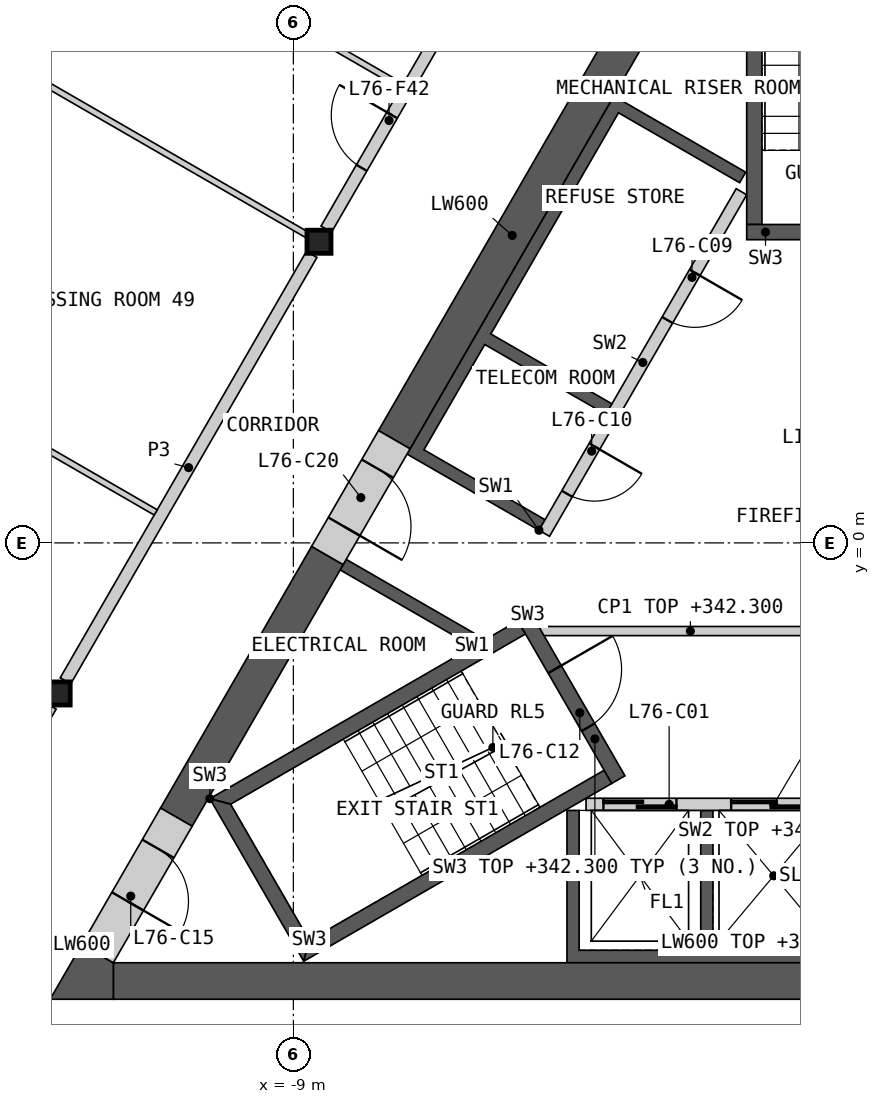
"""IFC4 building model, lengths in metres.
Left out: names, types, materials, properties, quantities, classifications, styles, units other than length and angle.
Written with IfcOpenShell. Run it as: python <this file> out.ifc"""

import sys

from ifc_helpers import new_model, si_unit, direction, frame, frame_2d, origin, origin_2d, place, context, subcontext, project, spatial, polyline, rectangle, i_section, outline, extrude, element, fill, save


model = new_model("IFC4")
c1 = context("Model", 3, precision=1e-05, world=origin(), true_north=direction((0.0, 1.0)))
c2 = subcontext(c1, "Body", "Model", "MODEL_VIEW")
j1 = project(units=[si_unit("LENGTHUNIT", "METRE"), si_unit("PLANEANGLEUNIT", "RADIAN")], contexts=[c1])
p1 = place(None, origin())
s1 = spatial("IfcSite", under=j1, at=p1, CompositionType="ELEMENT")
p2 = place(p1, origin())
s2 = spatial("IfcBuilding", under=s1, at=p2, CompositionType="ELEMENT")
p3 = place(p2, frame((0.0, 0.0, 339.2)))
s3 = spatial("IfcBuildingStorey", under=s2, at=p3, CompositionType="ELEMENT", Elevation=339.2)
for number, where, z_axis, x_axis in (
    (1, (-8.578, 4.953, 0.0), (0.0, 0.0, 1.0), (1.0, 0.0, 0.0)),
    (2, (-12.868, -2.476, 0.0), (0.0, 0.0, 1.0), (1.0, 0.0, 0.0)),
):
    element("IfcColumn", number, at=place(p3, frame(where, z_axis=z_axis, x_axis=x_axis)), inside=s3, PredefinedType="COLUMN", context=c2, shape_type="SweptSolid", body=[
        extrude(i_section(OverallWidth=0.396, OverallDepth=0.381, WebThickness=0.019, FlangeThickness=0.03, at=origin_2d()), origin(), (0.0, 0.0, 1.0), 3.4),
    ])
p4 = place(p3, origin())
e3 = element("IfcWall", 3, at=p4, inside=s3, PredefinedType="SHEAR", context=c2, shape_type="SweptSolid", body=[
    extrude(outline(polyline([(4.5, -4.4), (4.5, -6.906), (-4.5, -6.906), (-4.5, -4.4), (-4.3, -4.4), (-4.3, -6.7), (-2.3, -6.7), (-2.3, -4.4), (-2.1, -4.4), (-2.1, -6.7), (-0.1, -6.7), (-0.1, -4.4), (0.1, -4.4), (0.1, -6.7), (2.1, -6.7), (2.1, -4.4), (2.3, -4.4), (2.3, -6.7), (4.3, -6.7), (4.3, -4.4), (4.5, -4.4)])), origin(), (0.0, 0.0, 1.0), 3.1),
])
p5 = place(p3, frame((-4.187, -4.3, 0.0), z_axis=(0.0, 0.0, 1.0), x_axis=(1.0, 0.0, 0.0)))
e4 = element("IfcWall", 4, at=p5, inside=s3, PredefinedType="SOLIDWALL", context=c2, shape_type="SweptSolid", body=[
    extrude(rectangle(XDim=8.373, YDim=0.2, at=frame_2d((4.187, 0.0))), origin(), (0.0, 0.0, 1.0), 3.1),
])
p6 = place(p5, frame((0.287, 0.0, 0.0)))
e5 = element("IfcOpeningElement", 5, at=p6, cuts=e4, PredefinedType="OPENING", context=c2, shape_type="SweptSolid", body=[
    extrude(rectangle(XDim=1.2, YDim=2.1, at=frame_2d((0.6, 1.05))), frame((0.0, 0.11, 0.0), z_axis=(0.0, -1.0, 0.0), x_axis=(1.0, 0.0, 0.0)), (0.0, 0.0, 1.0), 0.22),
])
p7 = place(p5, frame((2.387, 0.0, 0.0)))
e6 = element("IfcOpeningElement", 6, at=p7, cuts=e4, PredefinedType="OPENING", context=c2, shape_type="SweptSolid", body=[
    extrude(rectangle(XDim=1.4, YDim=2.1, at=frame_2d((0.7, 1.05))), frame((0.0, 0.11, 0.0), z_axis=(0.0, -1.0, 0.0), x_axis=(1.0, 0.0, 0.0)), (0.0, 0.0, 1.0), 0.22),
])
p8 = place(p5, frame((4.737, 0.0, 0.0)))
e7 = element("IfcOpeningElement", 7, at=p8, cuts=e4, PredefinedType="OPENING", context=c2, shape_type="SweptSolid", body=[
    extrude(rectangle(XDim=1.1, YDim=2.1, at=frame_2d((0.55, 1.05))), frame((0.0, 0.11, 0.0), z_axis=(0.0, -1.0, 0.0), x_axis=(1.0, 0.0, 0.0)), (0.0, 0.0, 1.0), 0.22),
])
p9 = place(p5, frame((6.887, 0.0, 0.0)))
e8 = element("IfcOpeningElement", 8, at=p9, cuts=e4, PredefinedType="OPENING", context=c2, shape_type="SweptSolid", body=[
    extrude(rectangle(XDim=1.2, YDim=2.1, at=frame_2d((0.6, 1.05))), frame((0.0, 0.11, 0.0), z_axis=(0.0, -1.0, 0.0), x_axis=(1.0, 0.0, 0.0)), (0.0, 0.0, 1.0), 0.22),
])
p10 = place(p3, origin())
e9 = element("IfcWall", 9, at=p10, inside=s3, PredefinedType="SHEAR", context=c2, shape_type="SweptSolid", body=[
    extrude(outline(polyline([(-6.061, -1.697), (-8.231, -0.444), (-8.131, -0.271), (-5.96, -1.524), (-6.061, -1.697)])), origin(), (0.0, 0.0, 1.0), 3.1),
])
p11 = place(p3, origin())
e10 = element("IfcWall", 10, at=p11, inside=s3, PredefinedType="SHEAR", context=c2, shape_type="SweptSolid", body=[
    extrude(outline(polyline([(-4.96, 0.208), (-7.131, 1.461), (-3.731, 7.35), (-1.561, 6.097), (-1.66, 5.924), (-3.652, 7.074), (-5.752, 3.437), (-3.76, 2.287), (-3.861, 2.113), (-5.852, 3.263), (-6.852, 1.531), (-4.861, 0.381), (-4.96, 0.208)])), origin(), (0.0, 0.0, 1.0), 3.1),
])
p12 = place(p3, frame((-1.631, 5.776, 0.0), z_axis=(0.0, 0.0, 1.0), x_axis=(-0.499992876559, -0.866029516466, 0.0)))
e11 = element("IfcWall", 11, at=p12, inside=s3, PredefinedType="SOLIDWALL", context=c2, shape_type="SweptSolid", body=[
    extrude(rectangle(XDim=6.486, YDim=0.2, at=frame_2d((3.243, 0.0))), origin(), (0.0, 0.0, 1.0), 3.1),
])
p13 = place(p12, frame((1.537, 0.0, 0.0)))
e12 = element("IfcOpeningElement", 12, at=p13, cuts=e11, PredefinedType="OPENING", context=c2, shape_type="SweptSolid", body=[
    extrude(rectangle(XDim=0.9, YDim=2.1, at=frame_2d((0.45, 1.05))), frame((0.0, 0.11, 0.0), z_axis=(0.0, -1.0, 0.0), x_axis=(1.0, 0.0, 0.0)), (0.0, 0.0, 1.0), 0.22),
])
p14 = place(p12, frame((4.837, 0.0, 0.0)))
e13 = element("IfcOpeningElement", 13, at=p14, cuts=e11, PredefinedType="OPENING", context=c2, shape_type="SweptSolid", body=[
    extrude(rectangle(XDim=0.9, YDim=2.1, at=frame_2d((0.45, 1.05))), frame((0.0, 0.11, 0.0), z_axis=(0.0, -1.0, 0.0), x_axis=(1.0, 0.0, 0.0)), (0.0, 0.0, 1.0), 0.22),
])
p15 = place(p3, frame((-4.941, -1.45, 0.0), z_axis=(0.0, 0.0, 1.0), x_axis=(1.0, 0.0, 0.0)))
e14 = element("IfcWall", 14, at=p15, inside=s3, PredefinedType="PARTITIONING", context=c2, shape_type="SweptSolid", body=[
    extrude(rectangle(XDim=9.882, YDim=0.15, at=frame_2d((4.941, 0.0))), origin(), (0.0, 0.0, 1.0), 3.1),
])
p16 = place(p15, frame((4.391, 0.0, 0.0)))
e15 = element("IfcOpeningElement", 15, at=p16, cuts=e14, PredefinedType="OPENING", context=c2, shape_type="SweptSolid", body=[
    extrude(rectangle(XDim=1.1, YDim=2.1, at=frame_2d((0.55, 1.05))), frame((0.0, 0.085, 0.0), z_axis=(0.0, -1.0, 0.0), x_axis=(1.0, 0.0, 0.0)), (0.0, 0.0, 1.0), 0.17),
])
p17 = place(p3, origin())
e16 = element("IfcWall", 16, at=p17, inside=s3, PredefinedType="SHEAR", context=c2, shape_type="SweptSolid", body=[
    extrude(outline(polyline([(-5.307, -1.281), (-10.374, -4.206), (-10.032, -4.298), (-5.182, -1.498), (-5.307, -1.281)])), origin(), (0.0, 0.0, 1.0), 3.1),
])
p18 = place(p3, origin())
e17 = element("IfcWall", 17, at=p18, inside=s3, PredefinedType="SHEAR", context=c2, shape_type="SweptSolid", body=[
    extrude(outline(polyline([(-10.374, -4.206), (-8.83, -6.881), (-8.738, -6.539), (-10.032, -4.298), (-10.374, -4.206)])), origin(), (0.0, 0.0, 1.0), 3.1),
])
p19 = place(p3, origin())
e18 = element("IfcWall", 18, at=p19, inside=s3, PredefinedType="SHEAR", context=c2, shape_type="SweptSolid", body=[
    extrude(outline(polyline([(-8.738, -6.539), (-8.83, -6.881), (-3.763, -3.956), (-3.888, -3.739), (-8.738, -6.539)])), origin(), (0.0, 0.0, 1.0), 3.1),
])
p20 = place(p3, frame((-5.199, -1.219, 0.0), z_axis=(0.0, 0.0, 1.0), x_axis=(0.499982516597, -0.866035497597, 0.0)))
e19 = element("IfcWall", 19, at=p20, inside=s3, PredefinedType="SHEAR", context=c2, shape_type="SweptSolid", body=[
    extrude(rectangle(XDim=3.088, YDim=0.25, at=frame_2d((1.544, 0.0))), origin(), (0.0, 0.0, 1.0), 3.1),
])
p21 = place(p20, frame((0.994, 0.0, 0.0)))
e20 = element("IfcOpeningElement", 20, at=p21, cuts=e19, PredefinedType="OPENING", context=c2, shape_type="SweptSolid", body=[
    extrude(rectangle(XDim=1.1, YDim=2.1, at=frame_2d((0.55, 1.05))), frame((0.0, 0.135, 0.0), z_axis=(0.0, -1.0, 0.0), x_axis=(1.0, 0.0, 0.0)), (0.0, 0.0, 1.0), 0.27),
])
p22 = place(p3, origin())
e21 = element("IfcWall", 21, at=p22, inside=s3, PredefinedType="SHEAR", context=c2, shape_type="SweptSolid", body=[
    extrude(outline(polyline([(-1.294, 10.837), (-1.544, 11.087), (-1.544, 5.237), (-1.294, 5.237), (-1.294, 10.837)])), origin(), (0.0, 0.0, 1.0), 3.1),
])
p23 = place(p3, frame((1.544, 5.112, 0.0), z_axis=(0.0, 0.0, 1.0), x_axis=(-1.0, 0.0, 0.0)))
e22 = element("IfcWall", 22, at=p23, inside=s3, PredefinedType="SHEAR", context=c2, shape_type="SweptSolid", body=[
    extrude(rectangle(XDim=3.088, YDim=0.25, at=frame_2d((1.544, 0.0))), origin(), (0.0, 0.0, 1.0), 3.1),
])
p24 = place(p23, frame((0.994, 0.0, 0.0)))
e23 = element("IfcOpeningElement", 23, at=p24, cuts=e22, PredefinedType="OPENING", context=c2, shape_type="SweptSolid", body=[
    extrude(rectangle(XDim=1.1, YDim=2.1, at=frame_2d((0.55, 1.05))), frame((0.0, 0.135, 0.0), z_axis=(0.0, -1.0, 0.0), x_axis=(1.0, 0.0, 0.0)), (0.0, 0.0, 1.0), 0.27),
])
p25 = place(p3, frame((-11.961, -7.206, 0.0), z_axis=(0.0, 0.0, 1.0), x_axis=(1.0, 0.0, 0.0)))
e24 = element("IfcWall", 24, at=p25, inside=s3, PredefinedType="SHEAR", context=c2, shape_type="SweptSolid", body=[
    extrude(rectangle(XDim=23.921, YDim=0.6, at=frame_2d((11.961, 0.0))), origin(), (0.0, 0.0, 1.0), 3.1),
])
p26 = place(p3, frame((-3.461, 8.417, 0.0), z_axis=(0.0, 0.0, 1.0), x_axis=(-0.50000391502, -0.866023143435, 0.0)))
e25 = element("IfcWall", 25, at=p26, inside=s3, PredefinedType="SHEAR", context=c2, shape_type="SweptSolid", body=[
    extrude(rectangle(XDim=7.759, YDim=0.6, at=frame_2d((3.879, 0.0))), origin(), (0.0, 0.0, 1.0), 3.1),
])
p27 = place(p3, frame((-8.44, -0.208, 0.0), z_axis=(0.0, 0.0, 1.0), x_axis=(-0.500007425856, -0.866021116422, 0.0)))
e26 = element("IfcWall", 26, at=p27, inside=s3, PredefinedType="SHEAR", context=c2, shape_type="SweptSolid", body=[
    extrude(rectangle(XDim=4.969, YDim=0.6, at=frame_2d((2.484, 0.0))), origin(), (0.0, 0.0, 1.0), 3.1),
])
p28 = place(p3, origin())
e27 = element("IfcWall", 27, at=p28, inside=s3, PredefinedType="SHEAR", context=c2, shape_type="SweptSolid", body=[
    extrude(outline(polyline([(-12.48, -6.606), (-11.961, -6.906), (-11.961, -7.506), (-13.0, -7.506), (-12.48, -6.606)])), origin(), (0.0, 0.0, 1.0), 3.1),
])
p29 = place(p3, frame((-10.925, -4.511, 0.0), z_axis=(0.0, 0.0, 1.0), x_axis=(-0.500018667571, -0.866014625789, 0.0)))
e28 = element("IfcWall", 28, at=p29, inside=s3, PredefinedType="SHEAR", context=c2, shape_type="SweptSolid", body=[
    extrude(rectangle(XDim=2.592, YDim=0.6, at=frame_2d((1.296, 0.0))), origin(), (0.0, 0.0, 1.0), 3.1),
])
p30 = place(p29, frame((0.6, 0.0, 0.0)))
e29 = element("IfcOpeningElement", 29, at=p30, cuts=e28, PredefinedType="OPENING", context=c2, shape_type="SweptSolid", body=[
    extrude(rectangle(XDim=1.0, YDim=2.1, at=frame_2d((0.5, 1.05))), frame((0.0, 0.31, 0.0), z_axis=(0.0, -1.0, 0.0), x_axis=(1.0, 0.0, 0.0)), (0.0, 0.0, 1.0), 0.62),
])
p31 = place(p3, frame((-7.34, 1.698, 0.0), z_axis=(0.0, 0.0, 1.0), x_axis=(-0.50002983664, -0.866008176907, 0.0)))
e30 = element("IfcWall", 30, at=p31, inside=s3, PredefinedType="SHEAR", context=c2, shape_type="SweptSolid", body=[
    extrude(rectangle(XDim=2.2, YDim=0.6, at=frame_2d((1.1, 0.0))), origin(), (0.0, 0.0, 1.0), 3.1),
])
p32 = place(p31, frame((0.55, 0.0, 0.0)))
e31 = element("IfcOpeningElement", 31, at=p32, cuts=e30, PredefinedType="OPENING", context=c2, shape_type="SweptSolid", body=[
    extrude(rectangle(XDim=1.1, YDim=2.1, at=frame_2d((0.55, 1.05))), frame((0.0, 0.31, 0.0), z_axis=(0.0, -1.0, 0.0), x_axis=(1.0, 0.0, 0.0)), (0.0, 0.0, 1.0), 0.62),
])
p33 = place(p3, frame((-8.458, 5.16, 0.0), z_axis=(0.0, 0.0, 1.0), x_axis=(0.499984266882, 0.866034487114, 0.0)))
e32 = element("IfcWall", 32, at=p33, inside=s3, PredefinedType="PARTITIONING", context=c2, shape_type="SweptSolid", body=[
    extrude(rectangle(XDim=8.099, YDim=0.2, at=frame_2d((4.049, 0.0))), origin(), (0.0, 0.0, 1.0), 3.1),
])
p34 = place(p33, frame((1.164, 0.0, 0.0)))
e33 = element("IfcOpeningElement", 33, at=p34, cuts=e32, PredefinedType="OPENING", context=c2, shape_type="SweptSolid", body=[
    extrude(rectangle(XDim=1.0, YDim=2.1, at=frame_2d((0.5, 1.05))), frame((0.0, 0.11, 0.0), z_axis=(0.0, -1.0, 0.0), x_axis=(1.0, 0.0, 0.0)), (0.0, 0.0, 1.0), 0.22),
])
p35 = place(p3, frame((-12.748, -2.269, 0.0), z_axis=(0.0, 0.0, 1.0), x_axis=(0.499984266882, 0.866034487114, 0.0)))
e34 = element("IfcWall", 34, at=p35, inside=s3, PredefinedType="PARTITIONING", context=c2, shape_type="SweptSolid", body=[
    extrude(rectangle(XDim=8.099, YDim=0.2, at=frame_2d((4.049, 0.0))), origin(), (0.0, 0.0, 1.0), 3.1),
])
p36 = place(p3, frame((-15.131, -6.397, 0.0), z_axis=(0.0, 0.0, 1.0), x_axis=(0.500003406062, 0.866023437285, 0.0)))
e35 = element("IfcWall", 35, at=p36, inside=s3, PredefinedType="PARTITIONING", context=c2, shape_type="SweptSolid", body=[
    extrude(rectangle(XDim=4.288, YDim=0.2, at=frame_2d((2.144, 0.0))), origin(), (0.0, 0.0, 1.0), 3.1),
])
p37 = place(p36, frame((0.766, 0.0, 0.0)))
e36 = element("IfcOpeningElement", 36, at=p37, cuts=e35, PredefinedType="OPENING", context=c2, shape_type="SweptSolid", body=[
    extrude(rectangle(XDim=1.0, YDim=2.1, at=frame_2d((0.5, 1.05))), frame((0.0, 0.11, 0.0), z_axis=(0.0, -1.0, 0.0), x_axis=(1.0, 0.0, 0.0)), (0.0, 0.0, 1.0), 0.22),
])
p38 = place(p3, frame((-19.615, 11.325, 0.0), z_axis=(0.0, 0.0, 1.0), x_axis=(0.86602139559, -0.500006942333, 0.0)))
e37 = element("IfcWall", 37, at=p38, inside=s3, PredefinedType="PARTITIONING", context=c2, shape_type="SweptSolid", body=[
    extrude(rectangle(XDim=12.505, YDim=0.1, at=frame_2d((6.252, 0.0))), origin(), (0.0, 0.0, 1.0), 2.33),
])
p39 = place(p38, frame((6.38, 0.0, 0.0)))
e38 = element("IfcOpeningElement", 38, at=p39, cuts=e37, PredefinedType="OPENING", context=c2, shape_type="SweptSolid", body=[
    extrude(rectangle(XDim=0.95, YDim=2.1, at=frame_2d((0.475, 1.05))), frame((0.0, 0.06, 0.0), z_axis=(0.0, -1.0, 0.0), x_axis=(1.0, 0.0, 0.0)), (0.0, 0.0, 1.0), 0.12),
])
p40 = place(p3, frame((-18.161, 4.484, 0.0), z_axis=(0.0, 0.0, 1.0), x_axis=(0.86602732995, -0.499996663769, 0.0)))
e39 = element("IfcWall", 39, at=p40, inside=s3, PredefinedType="PARTITIONING", context=c2, shape_type="SweptSolid", body=[
    extrude(rectangle(XDim=7.964, YDim=0.1, at=frame_2d((3.982, 0.0))), origin(), (0.0, 0.0, 1.0), 2.33),
])
p41 = place(p40, frame((1.152, 0.0, 0.0)))
e40 = element("IfcOpeningElement", 40, at=p41, cuts=e39, PredefinedType="OPENING", context=c2, shape_type="SweptSolid", body=[
    extrude(rectangle(XDim=0.95, YDim=2.1, at=frame_2d((0.475, 1.05))), frame((0.0, 0.06, 0.0), z_axis=(0.0, -1.0, 0.0), x_axis=(1.0, 0.0, 0.0)), (0.0, 0.0, 1.0), 0.12),
])
p42 = place(p3, frame((-9.511, 8.837, 0.0), z_axis=(0.0, 0.0, 1.0), x_axis=(0.866029095148, -0.499993606316, 0.0)))
e41 = element("IfcWall", 41, at=p42, inside=s3, PredefinedType="PARTITIONING", context=c2, shape_type="SweptSolid", body=[
    extrude(rectangle(XDim=2.65, YDim=0.1, at=frame_2d((1.325, 0.0))), origin(), (0.0, 0.0, 1.0), 2.33),
])
p43 = place(p6, origin())
e42 = element("IfcDoor", 42, at=p43, inside=s3, OperationType="SLIDING_TO_LEFT", PredefinedType="DOOR", context=c2, shape_type="SweptSolid", body=[
    extrude(rectangle(XDim=1.2, YDim=2.1, at=frame_2d((0.6, 1.05))), frame((0.0, 0.025, 0.0), z_axis=(0.0, -1.0, 0.0), x_axis=(1.0, 0.0, 0.0)), (0.0, 0.0, 1.0), 0.05),
])
fill(e5, e42)
p44 = place(p7, origin())
e43 = element("IfcDoor", 43, at=p44, inside=s3, OperationType="SLIDING_TO_LEFT", PredefinedType="DOOR", context=c2, shape_type="SweptSolid", body=[
    extrude(rectangle(XDim=1.4, YDim=2.1, at=frame_2d((0.7, 1.05))), frame((0.0, 0.025, 0.0), z_axis=(0.0, -1.0, 0.0), x_axis=(1.0, 0.0, 0.0)), (0.0, 0.0, 1.0), 0.05),
])
fill(e6, e43)
p45 = place(p13, origin())
e44 = element("IfcDoor", 44, at=p45, inside=s3, OperationType="SINGLE_SWING_LEFT", PredefinedType="DOOR", context=c2, shape_type="SweptSolid", body=[
    extrude(rectangle(XDim=0.9, YDim=2.1, at=frame_2d((0.45, 1.05))), frame((0.0, 0.025, 0.0), z_axis=(0.0, -1.0, 0.0), x_axis=(1.0, 0.0, 0.0)), (0.0, 0.0, 1.0), 0.05),
])
fill(e12, e44)
p46 = place(p14, origin())
e45 = element("IfcDoor", 45, at=p46, inside=s3, OperationType="SINGLE_SWING_LEFT", PredefinedType="DOOR", context=c2, shape_type="SweptSolid", body=[
    extrude(rectangle(XDim=0.9, YDim=2.1, at=frame_2d((0.45, 1.05))), frame((0.0, 0.025, 0.0), z_axis=(0.0, -1.0, 0.0), x_axis=(1.0, 0.0, 0.0)), (0.0, 0.0, 1.0), 0.05),
])
fill(e13, e45)
p47 = place(p21, origin())
e46 = element("IfcDoor", 46, at=p47, inside=s3, OperationType="SINGLE_SWING_LEFT", PredefinedType="DOOR", context=c2, shape_type="SweptSolid", body=[
    extrude(rectangle(XDim=1.1, YDim=2.1, at=frame_2d((0.55, 1.05))), frame((0.0, 0.025, 0.0), z_axis=(0.0, -1.0, 0.0), x_axis=(1.0, 0.0, 0.0)), (0.0, 0.0, 1.0), 0.05),
])
fill(e20, e46)
p48 = place(p30, origin())
e47 = element("IfcDoor", 47, at=p48, inside=s3, OperationType="SINGLE_SWING_RIGHT", PredefinedType="DOOR", context=c2, shape_type="SweptSolid", body=[
    extrude(rectangle(XDim=1.0, YDim=2.1, at=frame_2d((0.5, 1.05))), frame((0.0, 0.055, 0.0), z_axis=(0.0, -1.0, 0.0), x_axis=(1.0, 0.0, 0.0)), (0.0, 0.0, 1.0), 0.05),
])
fill(e29, e47)
p49 = place(p32, origin())
e48 = element("IfcDoor", 48, at=p49, inside=s3, OperationType="SINGLE_SWING_RIGHT", PredefinedType="DOOR", context=c2, shape_type="SweptSolid", body=[
    extrude(rectangle(XDim=1.1, YDim=2.1, at=frame_2d((0.55, 1.05))), frame((0.0, 0.055, 0.0), z_axis=(0.0, -1.0, 0.0), x_axis=(1.0, 0.0, 0.0)), (0.0, 0.0, 1.0), 0.05),
])
fill(e31, e48)
p50 = place(p34, origin())
e49 = element("IfcDoor", 49, at=p50, inside=s3, OperationType="SINGLE_SWING_RIGHT", PredefinedType="DOOR", context=c2, shape_type="SweptSolid", body=[
    extrude(rectangle(XDim=1.0, YDim=2.1, at=frame_2d((0.5, 1.05))), frame((0.0, 0.025, 0.0), z_axis=(0.0, -1.0, 0.0), x_axis=(1.0, 0.0, 0.0)), (0.0, 0.0, 1.0), 0.05),
])
fill(e33, e49)
save(model, sys.argv[1])
